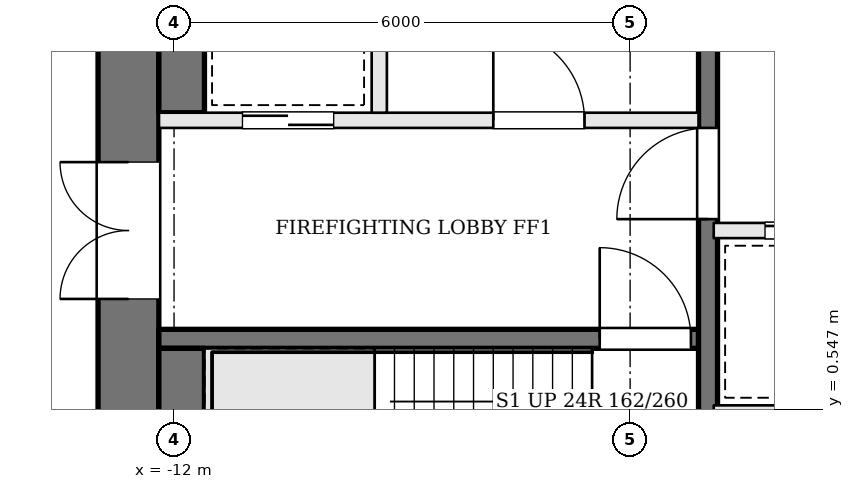
"""IFC4 building model, lengths in metres.
Left out: names, types, materials, properties, quantities, classifications, styles, units other than length and angle.
Written with IfcOpenShell. Run it as: python <this file> out.ifc"""

import sys

from ifc_helpers import new_model, si_unit, direction, frame, frame_2d, origin, place, context, subcontext, project, spatial, rectangle, extrude, element, fill, save


model = new_model("IFC4")
c1 = context("Model", 3, precision=1e-05, world=origin(), true_north=direction((0.0, 1.0)))
c2 = subcontext(c1, "Body", "Model", "MODEL_VIEW")
j1 = project(units=[si_unit("LENGTHUNIT", "METRE"), si_unit("PLANEANGLEUNIT", "RADIAN")], contexts=[c1])
p1 = place(None, origin())
s1 = spatial("IfcSite", under=j1, at=p1, CompositionType="ELEMENT")
p2 = place(p1, origin())
s2 = spatial("IfcBuilding", under=s1, at=p2, CompositionType="ELEMENT")
p3 = place(p2, frame((0.0, 0.0, 197.4)))
s3 = spatial("IfcBuildingStorey", under=s2, at=p3, CompositionType="ELEMENT", Elevation=197.4)
p4 = place(p3, frame((-12.6, -2.2, 0.0), z_axis=(0.0, 0.0, 1.0), x_axis=(0.0, 1.0, 0.0)))
e1 = element("IfcWall", 1, at=p4, inside=s3, PredefinedType="SHEAR", context=c2, shape_type="SweptSolid", body=[
    extrude(rectangle(XDim=13.4, YDim=0.8, at=frame_2d((6.7, 0.0))), origin(), (0.0, 0.0, 1.0), 3.9),
])
p5 = place(p4, frame((4.2, 0.0, 0.0)))
e2 = element("IfcOpeningElement", 2, at=p5, cuts=e1, PredefinedType="OPENING", context=c2, shape_type="SweptSolid", body=[
    extrude(rectangle(XDim=1.8, YDim=2.1, at=frame_2d((0.9, 1.05))), frame((0.0, 0.41, 0.0), z_axis=(0.0, -1.0, 0.0), x_axis=(1.0, 0.0, 0.0)), (0.0, 0.0, 1.0), 0.82),
])
p6 = place(p3, frame((-12.2, 1.475, 0.0), z_axis=(0.0, 0.0, 1.0), x_axis=(1.0, 0.0, 0.0)))
e3 = element("IfcWall", 3, at=p6, inside=s3, PredefinedType="SOLIDWALL", context=c2, shape_type="SweptSolid", body=[
    extrude(rectangle(XDim=7.1, YDim=0.25, at=frame_2d((3.55, 0.0))), origin(), (0.0, 0.0, 1.0), 3.7),
])
p7 = place(p6, frame((5.8, 0.0, 0.0)))
e4 = element("IfcOpeningElement", 4, at=p7, cuts=e3, PredefinedType="OPENING", context=c2, shape_type="SweptSolid", body=[
    extrude(rectangle(XDim=1.2, YDim=2.1, at=frame_2d((0.6, 1.05))), frame((0.0, 0.135, 0.0), z_axis=(0.0, -1.0, 0.0), x_axis=(1.0, 0.0, 0.0)), (0.0, 0.0, 1.0), 0.27),
])
p8 = place(p3, frame((-12.2, 4.35, 0.0), z_axis=(0.0, 0.0, 1.0), x_axis=(1.0, 0.0, 0.0)))
e5 = element("IfcWall", 5, at=p8, inside=s3, PredefinedType="SOLIDWALL", context=c2, shape_type="SweptSolid", body=[
    extrude(rectangle(XDim=7.1, YDim=0.2, at=frame_2d((3.55, 0.0))), origin(), (0.0, 0.0, 1.0), 3.7),
])
p9 = place(p8, frame((4.4, 0.0, 0.0)))
e6 = element("IfcOpeningElement", 6, at=p9, cuts=e5, PredefinedType="OPENING", context=c2, shape_type="SweptSolid", body=[
    extrude(rectangle(XDim=1.2, YDim=2.1, at=frame_2d((0.6, 1.05))), frame((0.0, 0.11, 0.0), z_axis=(0.0, -1.0, 0.0), x_axis=(1.0, 0.0, 0.0)), (0.0, 0.0, 1.0), 0.22),
])
p10 = place(p8, frame((1.1, 0.0, 0.0)))
e7 = element("IfcOpeningElement", 7, at=p10, cuts=e5, PredefinedType="OPENING", context=c2, shape_type="SweptSolid", body=[
    extrude(rectangle(XDim=1.2, YDim=2.1, at=frame_2d((0.6, 1.05))), frame((0.0, 0.11, 0.0), z_axis=(0.0, -1.0, 0.0), x_axis=(1.0, 0.0, 0.0)), (0.0, 0.0, 1.0), 0.22),
])
p11 = place(p3, frame((-9.3, 4.45, 0.0), z_axis=(0.0, 0.0, 1.0), x_axis=(0.0, 1.0, 0.0)))
e8 = element("IfcWall", 8, at=p11, inside=s3, PredefinedType="SOLIDWALL", context=c2, shape_type="SweptSolid", body=[
    extrude(rectangle(XDim=3.0, YDim=0.2, at=frame_2d((1.5, 0.0))), origin(), (0.0, 0.0, 1.0), 3.7),
])
p12 = place(p3, frame((-4.975, -2.2, 0.0), z_axis=(0.0, 0.0, 1.0), x_axis=(0.0, 1.0, 0.0)))
e9 = element("IfcWall", 9, at=p12, inside=s3, PredefinedType="SOLIDWALL", context=c2, shape_type="SweptSolid", body=[
    extrude(rectangle(XDim=13.4, YDim=0.25, at=frame_2d((6.7, 0.0))), origin(), (0.0, 0.0, 1.0), 3.7),
])
p13 = place(p12, frame((5.25, 0.0, 0.0)))
e10 = element("IfcOpeningElement", 10, at=p13, cuts=e9, PredefinedType="OPENING", context=c2, shape_type="SweptSolid", body=[
    extrude(rectangle(XDim=1.2, YDim=2.1, at=frame_2d((0.6, 1.05))), frame((0.0, 0.135, 0.0), z_axis=(0.0, -1.0, 0.0), x_axis=(1.0, 0.0, 0.0)), (0.0, 0.0, 1.0), 0.27),
])
p14 = place(p3, frame((-11.9, -1.6, 0.0), z_axis=(0.0, 0.0, 1.0), x_axis=(0.0, 1.0, 0.0)))
e11 = element("IfcWall", 11, at=p14, inside=s3, PredefinedType="SOLIDWALL", context=c2, shape_type="SweptSolid", body=[
    extrude(rectangle(XDim=2.95, YDim=0.6, at=frame_2d((1.475, 0.0))), origin(), (0.0, 0.0, 1.0), 3.7),
])
p15 = place(p3, frame((-11.9, 4.45, 0.0), z_axis=(0.0, 0.0, 1.0), x_axis=(0.0, 1.0, 0.0)))
e12 = element("IfcWall", 12, at=p15, inside=s3, PredefinedType="SOLIDWALL", context=c2, shape_type="SweptSolid", body=[
    extrude(rectangle(XDim=3.0, YDim=0.6, at=frame_2d((1.5, 0.0))), origin(), (0.0, 0.0, 1.0), 3.7),
])
p16 = place(p3, frame((-4.9, 0.5, 0.0), z_axis=(0.0, 0.0, 1.0), x_axis=(1.0, 0.0, 0.0)))
e13 = element("IfcWall", 13, at=p16, inside=s3, PredefinedType="SOLIDWALL", context=c2, shape_type="SweptSolid", body=[
    extrude(rectangle(XDim=9.8, YDim=0.2, at=frame_2d((4.9, 0.0))), origin(), (0.0, 0.0, 1.0), 3.7),
])
p17 = place(p3, frame((-4.9, 2.9, 0.0), z_axis=(0.0, 0.0, 1.0), x_axis=(1.0, 0.0, 0.0)))
e14 = element("IfcWall", 14, at=p17, inside=s3, PredefinedType="SOLIDWALL", context=c2, shape_type="SweptSolid", body=[
    extrude(rectangle(XDim=9.8, YDim=0.2, at=frame_2d((4.9, 0.0))), origin(), (0.0, 0.0, 1.0), 3.7),
])
p18 = place(p17, frame((0.675, 0.0, 0.0)))
e15 = element("IfcOpeningElement", 15, at=p18, cuts=e14, PredefinedType="OPENING", context=c2, shape_type="SweptSolid", body=[
    extrude(rectangle(XDim=1.1, YDim=2.1, at=frame_2d((0.55, 1.05))), frame((0.0, 0.11, 0.0), z_axis=(0.0, -1.0, 0.0), x_axis=(1.0, 0.0, 0.0)), (0.0, 0.0, 1.0), 0.22),
])
p19 = place(p17, frame((2.613, 0.0, 0.0)))
e16 = element("IfcOpeningElement", 16, at=p19, cuts=e14, PredefinedType="OPENING", context=c2, shape_type="SweptSolid", body=[
    extrude(rectangle(XDim=0.9, YDim=2.1, at=frame_2d((0.45, 1.05))), frame((0.0, 0.11, 0.0), z_axis=(0.0, -1.0, 0.0), x_axis=(1.0, 0.0, 0.0)), (0.0, 0.0, 1.0), 0.22),
])
p20 = place(p17, frame((4.35, 0.0, 0.0)))
e17 = element("IfcOpeningElement", 17, at=p20, cuts=e14, PredefinedType="OPENING", context=c2, shape_type="SweptSolid", body=[
    extrude(rectangle(XDim=1.1, YDim=2.1, at=frame_2d((0.55, 1.05))), frame((0.0, 0.11, 0.0), z_axis=(0.0, -1.0, 0.0), x_axis=(1.0, 0.0, 0.0)), (0.0, 0.0, 1.0), 0.22),
])
p21 = place(p17, frame((7.463, 0.0, 0.0)))
e18 = element("IfcOpeningElement", 18, at=p21, cuts=e14, PredefinedType="OPENING", context=c2, shape_type="SweptSolid", body=[
    extrude(rectangle(XDim=1.0, YDim=2.1, at=frame_2d((0.5, 1.05))), frame((0.0, 0.11, 0.0), z_axis=(0.0, -1.0, 0.0), x_axis=(1.0, 0.0, 0.0)), (0.0, 0.0, 1.0), 0.22),
])
p22 = place(p5, origin())
e19 = element("IfcDoor", 19, at=p22, inside=s3, OperationType="DOUBLE_DOOR_SINGLE_SWING", PredefinedType="DOOR", context=c2, shape_type="SweptSolid", body=[
    extrude(rectangle(XDim=1.8, YDim=2.1, at=frame_2d((0.9, 1.05))), frame((0.0, 0.025, 0.0), z_axis=(0.0, -1.0, 0.0), x_axis=(1.0, 0.0, 0.0)), (0.0, 0.0, 1.0), 0.05),
])
fill(e2, e19)
p23 = place(p13, origin())
e20 = element("IfcDoor", 20, at=p23, inside=s3, OperationType="SINGLE_SWING_LEFT", PredefinedType="DOOR", context=c2, shape_type="SweptSolid", body=[
    extrude(rectangle(XDim=1.2, YDim=2.1, at=frame_2d((0.6, 1.05))), frame((0.0, 0.025, 0.0), z_axis=(0.0, -1.0, 0.0), x_axis=(1.0, 0.0, 0.0)), (0.0, 0.0, 1.0), 0.05),
])
fill(e10, e20)
p24 = place(p9, origin())
e21 = element("IfcDoor", 21, at=p24, inside=s3, OperationType="SINGLE_SWING_LEFT", PredefinedType="DOOR", context=c2, shape_type="SweptSolid", body=[
    extrude(rectangle(XDim=1.2, YDim=2.1, at=frame_2d((0.6, 1.05))), frame((0.0, 0.025, 0.0), z_axis=(0.0, -1.0, 0.0), x_axis=(1.0, 0.0, 0.0)), (0.0, 0.0, 1.0), 0.05),
])
fill(e6, e21)
p25 = place(p7, origin())
e22 = element("IfcDoor", 22, at=p25, inside=s3, OperationType="SINGLE_SWING_LEFT", PredefinedType="DOOR", context=c2, shape_type="SweptSolid", body=[
    extrude(rectangle(XDim=1.2, YDim=2.1, at=frame_2d((0.6, 1.05))), frame((0.0, 0.025, 0.0), z_axis=(0.0, -1.0, 0.0), x_axis=(1.0, 0.0, 0.0)), (0.0, 0.0, 1.0), 0.05),
])
fill(e4, e22)
p26 = place(p10, origin())
e23 = element("IfcDoor", 23, at=p26, inside=s3, OperationType="SLIDING_TO_RIGHT", PredefinedType="DOOR", context=c2, shape_type="SweptSolid", body=[
    extrude(rectangle(XDim=1.2, YDim=2.1, at=frame_2d((0.6, 1.05))), frame((0.0, 0.025, 0.0), z_axis=(0.0, -1.0, 0.0), x_axis=(1.0, 0.0, 0.0)), (0.0, 0.0, 1.0), 0.05),
])
fill(e7, e23)
p27 = place(p18, origin())
e24 = element("IfcDoor", 24, at=p27, inside=s3, OperationType="SLIDING_TO_RIGHT", PredefinedType="DOOR", context=c2, shape_type="SweptSolid", body=[
    extrude(rectangle(XDim=1.1, YDim=2.1, at=frame_2d((0.55, 1.05))), frame((0.0, 0.025, 0.0), z_axis=(0.0, -1.0, 0.0), x_axis=(1.0, 0.0, 0.0)), (0.0, 0.0, 1.0), 0.05),
])
fill(e15, e24)
save(model, sys.argv[1])
